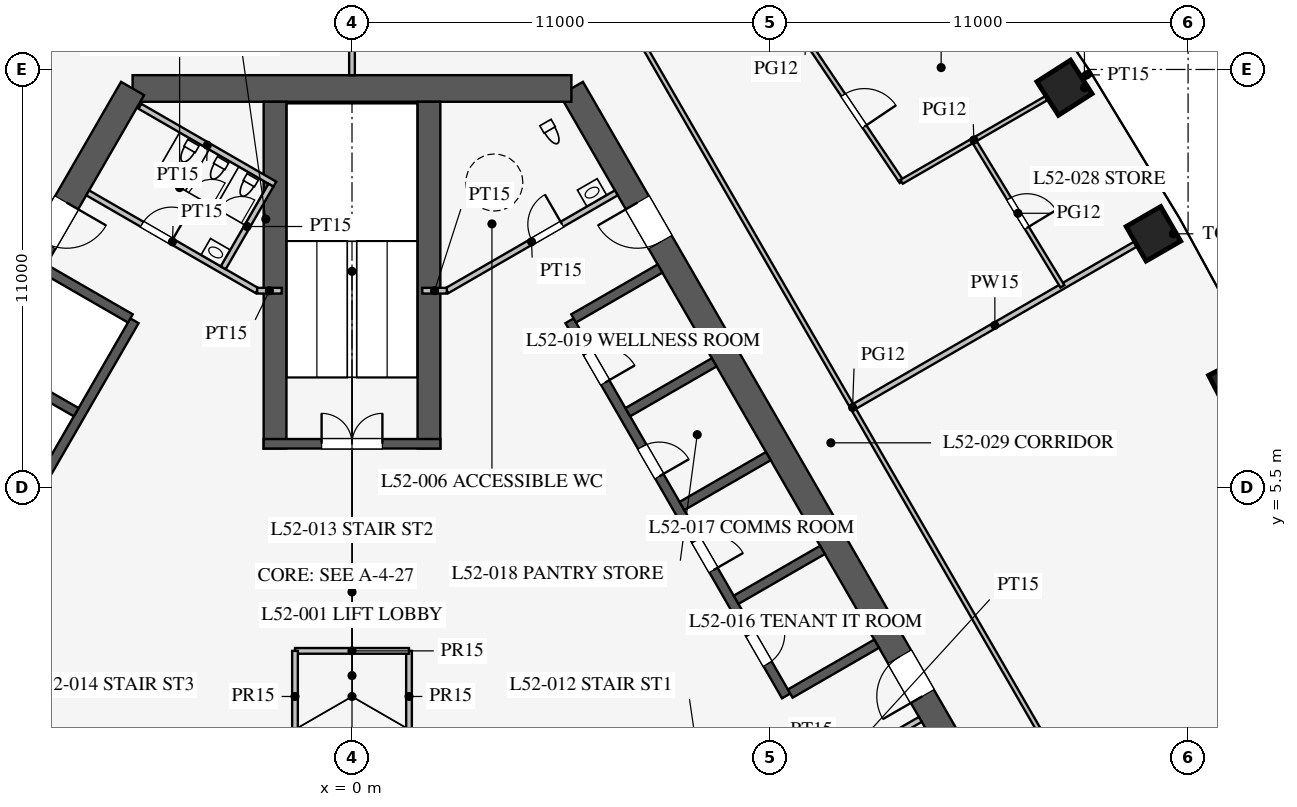
"""IFC4 building model, lengths in metres.
Left out: names, types, materials, properties, quantities, classifications, styles, units other than length and angle.
Written with IfcOpenShell. Run it as: python <this file> out.ifc"""

import sys

from ifc_helpers import new_model, si_unit, direction, frame, frame_2d, origin, origin_2d, place, context, subcontext, project, spatial, rectangle, extrude, element, fill, save


model = new_model("IFC4")
c1 = context("Model", 3, precision=1e-05, world=origin(), true_north=direction((0.0, 1.0)))
c2 = subcontext(c1, "Body", "Model", "MODEL_VIEW")
j1 = project(units=[si_unit("LENGTHUNIT", "METRE"), si_unit("PLANEANGLEUNIT", "RADIAN")], contexts=[c1])
p1 = place(None, origin())
s1 = spatial("IfcSite", under=j1, at=p1, CompositionType="ELEMENT")
p2 = place(p1, origin())
s2 = spatial("IfcBuilding", under=s1, at=p2, CompositionType="ELEMENT")
p3 = place(p2, frame((0.0, 0.0, 227.5)))
s3 = spatial("IfcBuildingStorey", under=s2, at=p3, CompositionType="ELEMENT", Elevation=227.5)
for number, where, z_axis, x_axis in (
    (1, (23.248, 8.226, 0.0), (0.0, 0.0, 1.0), (-0.46, 0.888, 0.0)),
    (2, (21.088, 12.175, 0.0), (0.0, 0.0, 1.0), (-0.5, 0.866, 0.0)),
    (3, (18.748, 16.02, 0.0), (0.0, 0.0, 1.0), (-0.539, 0.842, 0.0)),
):
    element("IfcColumn", number, at=place(p3, frame(where, z_axis=z_axis, x_axis=x_axis)), inside=s3, PredefinedType="COLUMN", context=c2, shape_type="SweptSolid", body=[
        extrude(rectangle(XDim=1.05, YDim=1.05, at=origin_2d()), origin(), (0.0, 0.0, 1.0), 4.2),
    ])
p4 = place(p3, frame((16.743, -3.0, 0.0), z_axis=(0.0, 0.0, 1.0), x_axis=(-0.500002442456, 0.866023993627, 0.0)))
e4 = element("IfcWall", 4, at=p4, inside=s3, PredefinedType="SHEAR", context=c2, shape_type="SweptSolid", body=[
    extrude(rectangle(XDim=21.939, YDim=0.7, at=frame_2d((10.97, 0.0))), origin(), (0.0, 0.0, 1.0), 4.2),
])
p5 = place(p4, frame((17.27, 0.0, 0.0)))
e5 = element("IfcOpeningElement", 5, at=p5, cuts=e4, PredefinedType="OPENING", context=c2, shape_type="SweptSolid", body=[
    extrude(rectangle(XDim=1.2, YDim=2.1, at=frame_2d((0.6, 1.05))), frame((0.0, 0.36, 0.0), z_axis=(0.0, -1.0, 0.0), x_axis=(1.0, 0.0, 0.0)), (0.0, 0.0, 1.0), 0.72),
])
p6 = place(p4, frame((3.47, 0.0, 0.0)))
e6 = element("IfcOpeningElement", 6, at=p6, cuts=e4, PredefinedType="OPENING", context=c2, shape_type="SweptSolid", body=[
    extrude(rectangle(XDim=1.2, YDim=2.1, at=frame_2d((0.6, 1.05))), frame((0.0, 0.36, 0.0), z_axis=(0.0, -1.0, 0.0), x_axis=(1.0, 0.0, 0.0)), (0.0, 0.0, 1.0), 0.72),
])
p7 = place(p3, frame((5.773, 16.0, 0.0), z_axis=(0.0, 0.0, 1.0), x_axis=(-1.0, 0.0, 0.0)))
e7 = element("IfcWall", 7, at=p7, inside=s3, PredefinedType="SHEAR", context=c2, shape_type="SweptSolid", body=[
    extrude(rectangle(XDim=11.547, YDim=0.7, at=frame_2d((5.773, 0.0))), origin(), (0.0, 0.0, 1.0), 4.2),
])
p8 = place(p3, frame((-5.773, 16.0, 0.0), z_axis=(0.0, 0.0, 1.0), x_axis=(-0.500002442456, -0.866023993627, 0.0)))
e8 = element("IfcWall", 8, at=p8, inside=s3, PredefinedType="SHEAR", context=c2, shape_type="SweptSolid", body=[
    extrude(rectangle(XDim=21.939, YDim=0.7, at=frame_2d((10.97, 0.0))), origin(), (0.0, 0.0, 1.0), 4.2),
])
p9 = place(p8, frame((17.27, 0.0, 0.0)))
e9 = element("IfcOpeningElement", 9, at=p9, cuts=e8, PredefinedType="OPENING", context=c2, shape_type="SweptSolid", body=[
    extrude(rectangle(XDim=1.2, YDim=2.1, at=frame_2d((0.6, 1.05))), frame((0.0, 0.36, 0.0), z_axis=(0.0, -1.0, 0.0), x_axis=(1.0, 0.0, 0.0)), (0.0, 0.0, 1.0), 0.72),
])
p10 = place(p8, frame((3.47, 0.0, 0.0)))
e10 = element("IfcOpeningElement", 10, at=p10, cuts=e8, PredefinedType="OPENING", context=c2, shape_type="SweptSolid", body=[
    extrude(rectangle(XDim=1.2, YDim=2.1, at=frame_2d((0.6, 1.05))), frame((0.0, 0.36, 0.0), z_axis=(0.0, -1.0, 0.0), x_axis=(1.0, 0.0, 0.0)), (0.0, 0.0, 1.0), 0.72),
])
p11 = place(p3, frame((11.424, 0.014, 0.0), z_axis=(0.0, 0.0, 1.0), x_axis=(-0.500001763848, 0.866024385424, 0.0)))
e11 = element("IfcWall", 11, at=p11, inside=s3, PredefinedType="SHEAR", context=c2, shape_type="SweptSolid", body=[
    extrude(rectangle(XDim=11.4, YDim=0.25, at=frame_2d((5.7, 0.0))), origin(), (0.0, 0.0, 1.0), 4.2),
])
p12 = place(p11, frame((0.975, 0.0, 0.0)))
e12 = element("IfcOpeningElement", 12, at=p12, cuts=e11, PredefinedType="OPENING", context=c2, shape_type="SweptSolid", body=[
    extrude(rectangle(XDim=0.9, YDim=2.1, at=frame_2d((0.45, 1.05))), frame((0.0, 0.135, 0.0), z_axis=(0.0, -1.0, 0.0), x_axis=(1.0, 0.0, 0.0)), (0.0, 0.0, 1.0), 0.27),
])
p13 = place(p11, frame((3.825, 0.0, 0.0)))
e13 = element("IfcOpeningElement", 13, at=p13, cuts=e11, PredefinedType="OPENING", context=c2, shape_type="SweptSolid", body=[
    extrude(rectangle(XDim=0.9, YDim=2.1, at=frame_2d((0.45, 1.05))), frame((0.0, 0.135, 0.0), z_axis=(0.0, -1.0, 0.0), x_axis=(1.0, 0.0, 0.0)), (0.0, 0.0, 1.0), 0.27),
])
p14 = place(p11, frame((6.675, 0.0, 0.0)))
e14 = element("IfcOpeningElement", 14, at=p14, cuts=e11, PredefinedType="OPENING", context=c2, shape_type="SweptSolid", body=[
    extrude(rectangle(XDim=0.9, YDim=2.1, at=frame_2d((0.45, 1.05))), frame((0.0, 0.135, 0.0), z_axis=(0.0, -1.0, 0.0), x_axis=(1.0, 0.0, 0.0)), (0.0, 0.0, 1.0), 0.27),
])
p15 = place(p11, frame((9.525, 0.0, 0.0)))
e15 = element("IfcOpeningElement", 15, at=p15, cuts=e11, PredefinedType="OPENING", context=c2, shape_type="SweptSolid", body=[
    extrude(rectangle(XDim=0.9, YDim=2.1, at=frame_2d((0.45, 1.05))), frame((0.0, 0.135, 0.0), z_axis=(0.0, -1.0, 0.0), x_axis=(1.0, 0.0, 0.0)), (0.0, 0.0, 1.0), 0.27),
])
for number, where, z_axis, x_axis in (
    (16, (11.532, 0.076, 0.0), (0.0, 0.0, 1.0), (0.866, 0.5, 0.0)),
    (17, (10.107, 2.544, 0.0), (0.0, 0.0, 1.0), (0.866, 0.5, 0.0)),
    (18, (8.682, 5.012, 0.0), (0.0, 0.0, 1.0), (0.866, 0.5, 0.0)),
    (19, (7.257, 7.481, 0.0), (0.0, 0.0, 1.0), (0.866, 0.5, 0.0)),
    (20, (5.832, 9.949, 0.0), (0.0, 0.0, 1.0), (0.866, 0.5, 0.0)),
):
    element("IfcWall", number, at=place(p3, frame(where, z_axis=z_axis, x_axis=x_axis)), inside=s3, PredefinedType="SHEAR", context=c2, shape_type="SweptSolid", body=[
        extrude(rectangle(XDim=2.625, YDim=0.25, at=frame_2d((1.312, 0.0))), origin(), (0.0, 0.0, 1.0), 4.2),
    ])
p16 = place(p3, frame((-5.724, 9.886, 0.0), z_axis=(0.0, 0.0, 1.0), x_axis=(-0.500001763848, -0.866024385424, 0.0)))
e21 = element("IfcWall", 21, at=p16, inside=s3, PredefinedType="SHEAR", context=c2, shape_type="SweptSolid", body=[
    extrude(rectangle(XDim=11.4, YDim=0.25, at=frame_2d((5.7, 0.0))), origin(), (0.0, 0.0, 1.0), 4.2),
])
p17 = place(p16, frame((6.525, 0.0, 0.0)))
e22 = element("IfcOpeningElement", 22, at=p17, cuts=e21, PredefinedType="OPENING", context=c2, shape_type="SweptSolid", body=[
    extrude(rectangle(XDim=1.2, YDim=2.2, at=frame_2d((0.6, 1.1))), frame((0.0, 0.135, 0.0), z_axis=(0.0, -1.0, 0.0), x_axis=(1.0, 0.0, 0.0)), (0.0, 0.0, 1.0), 0.27),
])
p18 = place(p16, frame((9.375, 0.0, 0.0)))
e23 = element("IfcOpeningElement", 23, at=p18, cuts=e21, PredefinedType="OPENING", context=c2, shape_type="SweptSolid", body=[
    extrude(rectangle(XDim=1.2, YDim=2.2, at=frame_2d((0.6, 1.1))), frame((0.0, 0.135, 0.0), z_axis=(0.0, -1.0, 0.0), x_axis=(1.0, 0.0, 0.0)), (0.0, 0.0, 1.0), 0.27),
])
for number, where, z_axis, x_axis in (
    (24, (-5.832, 9.949, 0.0), (0.0, 0.0, 1.0), (-0.866, 0.5, 0.0)),
    (25, (-7.257, 7.481, 0.0), (0.0, 0.0, 1.0), (-0.866, 0.5, 0.0)),
):
    element("IfcWall", number, at=place(p3, frame(where, z_axis=z_axis, x_axis=x_axis)), inside=s3, PredefinedType="SHEAR", context=c2, shape_type="SweptSolid", body=[
        extrude(rectangle(XDim=2.625, YDim=0.25, at=frame_2d((1.312, 0.0))), origin(), (0.0, 0.0, 1.0), 4.2),
    ])
for number, where, z_axis, x_axis in (
    (26, (2.025, 6.525, 0.0), (0.0, 0.0, 1.0), (0.0, 1.0, 0.0)),
    (27, (-2.025, 6.525, 0.0), (0.0, 0.0, 1.0), (0.0, 1.0, 0.0)),
):
    element("IfcWall", number, at=place(p3, frame(where, z_axis=z_axis, x_axis=x_axis)), inside=s3, PredefinedType="SHEAR", context=c2, shape_type="SweptSolid", body=[
        extrude(rectangle(XDim=9.125, YDim=0.6, at=frame_2d((4.562, 0.0))), origin(), (0.0, 0.0, 1.0), 4.2),
    ])
p19 = place(p3, frame((2.325, 6.65, 0.0), z_axis=(0.0, 0.0, 1.0), x_axis=(-1.0, 0.0, 0.0)))
e28 = element("IfcWall", 28, at=p19, inside=s3, PredefinedType="SHEAR", context=c2, shape_type="SweptSolid", body=[
    extrude(rectangle(XDim=4.65, YDim=0.25, at=frame_2d((2.325, 0.0))), origin(), (0.0, 0.0, 1.0), 4.2),
])
p20 = place(p19, frame((1.525, 0.0, 0.0)))
e29 = element("IfcOpeningElement", 29, at=p20, cuts=e28, PredefinedType="OPENING", context=c2, shape_type="SweptSolid", body=[
    extrude(rectangle(XDim=1.6, YDim=2.1, at=frame_2d((0.8, 1.05))), frame((0.0, 0.135, 0.0), z_axis=(0.0, -1.0, 0.0), x_axis=(1.0, 0.0, 0.0)), (0.0, 0.0, 1.0), 0.27),
])
p21 = place(p3, frame((2.495, 10.678, 0.0), z_axis=(0.0, 0.0, 1.0), x_axis=(0.866037967349, 0.499978238636, 0.0)))
e30 = element("IfcWall", 30, at=p21, inside=s3, PredefinedType="PARTITIONING", context=c2, shape_type="SweptSolid", body=[
    extrude(rectangle(XDim=5.15, YDim=0.15, at=frame_2d((2.575, 0.0))), origin(), (0.0, 0.0, 1.0), 4.0),
])
p22 = place(p21, frame((2.6, 0.0, 0.0)))
e31 = element("IfcOpeningElement", 31, at=p22, cuts=e30, PredefinedType="OPENING", context=c2, shape_type="SweptSolid", body=[
    extrude(rectangle(XDim=0.9, YDim=2.1, at=frame_2d((0.45, 1.05))), frame((0.0, 0.085, 0.0), z_axis=(0.0, -1.0, 0.0), x_axis=(1.0, 0.0, 0.0)), (0.0, 0.0, 1.0), 0.17),
])
p23 = place(p3, frame((10.495, -3.178, 0.0), z_axis=(0.0, 0.0, 1.0), x_axis=(0.866037967349, 0.499978238636, 0.0)))
e32 = element("IfcWall", 32, at=p23, inside=s3, PredefinedType="PARTITIONING", context=c2, shape_type="SweptSolid", body=[
    extrude(rectangle(XDim=5.15, YDim=0.15, at=frame_2d((2.575, 0.0))), origin(), (0.0, 0.0, 1.0), 4.0),
])
p24 = place(p23, frame((2.6, 0.0, 0.0)))
e33 = element("IfcOpeningElement", 33, at=p24, cuts=e32, PredefinedType="OPENING", context=c2, shape_type="SweptSolid", body=[
    extrude(rectangle(XDim=0.9, YDim=2.1, at=frame_2d((0.45, 1.05))), frame((0.0, 0.085, 0.0), z_axis=(0.0, -1.0, 0.0), x_axis=(1.0, 0.0, 0.0)), (0.0, 0.0, 1.0), 0.17),
])
p25 = place(p3, frame((-2.495, 10.678, 0.0), z_axis=(0.0, 0.0, 1.0), x_axis=(-0.866037967349, 0.499978238636, 0.0)))
e34 = element("IfcWall", 34, at=p25, inside=s3, PredefinedType="PARTITIONING", context=c2, shape_type="SweptSolid", body=[
    extrude(rectangle(XDim=5.15, YDim=0.15, at=frame_2d((2.575, 0.0))), origin(), (0.0, 0.0, 1.0), 4.0),
])
p26 = place(p25, frame((2.6, 0.0, 0.0)))
e35 = element("IfcOpeningElement", 35, at=p26, cuts=e34, PredefinedType="OPENING", context=c2, shape_type="SweptSolid", body=[
    extrude(rectangle(XDim=0.9, YDim=2.1, at=frame_2d((0.45, 1.05))), frame((0.0, 0.085, 0.0), z_axis=(0.0, -1.0, 0.0), x_axis=(1.0, 0.0, 0.0)), (0.0, 0.0, 1.0), 0.17),
])
for number, where, z_axis, x_axis in (
    (36, (2.495, 10.678, 0.0), (0.0, 0.0, 1.0), (-1.0, 0.0, 0.0)),
    (37, (-2.495, 10.678, 0.0), (0.0, 0.0, 1.0), (1.0, 0.0, 0.0)),
):
    element("IfcWall", number, at=place(p3, frame(where, z_axis=z_axis, x_axis=x_axis)), inside=s3, PredefinedType="PARTITIONING", context=c2, shape_type="SweptSolid", body=[
        extrude(rectangle(XDim=0.645, YDim=0.15, at=frame_2d((0.323, 0.0))), origin(), (0.0, 0.0, 1.0), 4.0),
    ])
p27 = place(p3, frame((-2.031, 13.482, 0.0), z_axis=(0.0, 0.0, 1.0), x_axis=(-0.866050731258, 0.499956128963, 0.0)))
e38 = element("IfcWall", 38, at=p27, inside=s3, PredefinedType="PARTITIONING", context=c2, shape_type="SweptSolid", body=[
    extrude(rectangle(XDim=4.1, YDim=0.15, at=frame_2d((2.05, 0.0))), origin(), (0.0, 0.0, 1.0), 4.0),
])
p28 = place(p3, frame((-3.389, 11.281, 0.0), z_axis=(0.0, 0.0, 1.0), x_axis=(0.499989096993, 0.866031698547, 0.0)))
e39 = element("IfcWall", 39, at=p28, inside=s3, PredefinedType="PARTITIONING", context=c2, shape_type="SweptSolid", body=[
    extrude(rectangle(XDim=2.51, YDim=0.15, at=frame_2d((1.255, 0.0))), origin(), (0.0, 0.0, 1.0), 4.0),
])
p29 = place(p3, frame((1.5, -1.2, 0.0), z_axis=(0.0, 0.0, 1.0), x_axis=(0.0, 1.0, 0.0)))
e40 = element("IfcWall", 40, at=p29, inside=s3, PredefinedType="PARTITIONING", context=c2, shape_type="SweptSolid", body=[
    extrude(rectangle(XDim=2.4, YDim=0.15, at=frame_2d((1.2, 0.0))), origin(), (0.0, 0.0, 1.0), 4.0),
])
p30 = place(p3, frame((1.5, 1.2, 0.0), z_axis=(0.0, 0.0, 1.0), x_axis=(-1.0, 0.0, 0.0)))
e41 = element("IfcWall", 41, at=p30, inside=s3, PredefinedType="PARTITIONING", context=c2, shape_type="SweptSolid", body=[
    extrude(rectangle(XDim=3.0, YDim=0.15, at=frame_2d((1.5, 0.0))), origin(), (0.0, 0.0, 1.0), 4.0),
])
p31 = place(p3, frame((-1.5, 1.2, 0.0), z_axis=(0.0, 0.0, 1.0), x_axis=(0.0, -1.0, 0.0)))
e42 = element("IfcWall", 42, at=p31, inside=s3, PredefinedType="PARTITIONING", context=c2, shape_type="SweptSolid", body=[
    extrude(rectangle(XDim=2.4, YDim=0.15, at=frame_2d((1.2, 0.0))), origin(), (0.0, 0.0, 1.0), 4.0),
])
p32 = place(p3, frame((0.0, 16.35, 0.0), z_axis=(0.0, 0.0, 1.0), x_axis=(0.0, 1.0, 0.0)))
e43 = element("IfcWall", 43, at=p32, inside=s3, PredefinedType="PARTITIONING", context=c2, shape_type="SweptSolid", body=[
    extrude(rectangle(XDim=15.0, YDim=0.15, at=frame_2d((7.5, 0.0))), origin(), (0.0, 0.0, 1.0), 2.4),
])
p33 = place(p3, frame((13.224, 7.635, 0.0), z_axis=(0.0, 0.0, 1.0), x_axis=(0.866035375346, 0.499982728352, 0.0)))
e44 = element("IfcWall", 44, at=p33, inside=s3, PredefinedType="PARTITIONING", context=c2, shape_type="SweptSolid", body=[
    extrude(rectangle(XDim=8.526, YDim=0.15, at=frame_2d((4.263, 0.0))), origin(), (0.0, 0.0, 1.0), 3.3),
])
p34 = place(p3, frame((26.328, -15.182, 0.0), z_axis=(0.0, 0.0, 1.0), x_axis=(-0.500000626146, 0.866025042278, 0.0)))
e45 = element("IfcWall", 45, at=p34, inside=s3, PredefinedType="PARTITIONING", context=c2, shape_type="SweptSolid", body=[
    extrude(rectangle(XDim=52.624, YDim=0.12, at=frame_2d((26.312, 0.0))), origin(), (0.0, 0.0, 1.0), 2.9),
])
p35 = place(p34, frame((10.15, 0.0, 0.15)))
e46 = element("IfcOpeningElement", 46, at=p35, cuts=e45, PredefinedType="OPENING", context=c2, shape_type="SweptSolid", body=[
    extrude(rectangle(XDim=1.8, YDim=2.1, at=frame_2d((0.9, 1.05))), frame((0.0, 0.07, 0.0), z_axis=(0.0, -1.0, 0.0), x_axis=(1.0, 0.0, 0.0)), (0.0, 0.0, 1.0), 0.14),
])
p36 = place(p34, frame((40.65, 0.0, 0.15)))
e47 = element("IfcOpeningElement", 47, at=p36, cuts=e45, PredefinedType="OPENING", context=c2, shape_type="SweptSolid", body=[
    extrude(rectangle(XDim=1.8, YDim=2.1, at=frame_2d((0.9, 1.05))), frame((0.0, 0.07, 0.0), z_axis=(0.0, -1.0, 0.0), x_axis=(1.0, 0.0, 0.0)), (0.0, 0.0, 1.0), 0.14),
])
p37 = place(p3, frame((19.227, 16.297, 0.0), z_axis=(0.0, 0.0, 1.0), x_axis=(0.866135455726, 0.499809335981, 0.0)))
e48 = element("IfcWall", 48, at=p37, inside=s3, PredefinedType="PARTITIONING", context=c2, shape_type="SweptSolid", body=[
    extrude(rectangle(XDim=0.243, YDim=0.15, at=frame_2d((0.122, 0.0))), origin(), (0.0, 0.0, 1.0), 2.9),
])
p38 = place(p3, frame((18.694, 10.793, 0.0), z_axis=(0.0, 0.0, 1.0), x_axis=(-0.519726678229, 0.854332593278, 0.0)))
e49 = element("IfcWall", 49, at=p38, inside=s3, PredefinedType="PARTITIONING", context=c2, shape_type="SweptSolid", body=[
    extrude(rectangle(XDim=4.501, YDim=0.12, at=frame_2d((2.25, 0.0))), origin(), (0.0, 0.0, 1.0), 2.9),
])
p39 = place(p38, frame((1.8, 0.0, 0.15)))
e50 = element("IfcOpeningElement", 50, at=p39, cuts=e49, PredefinedType="OPENING", context=c2, shape_type="SweptSolid", body=[
    extrude(rectangle(XDim=0.9, YDim=2.1, at=frame_2d((0.45, 1.05))), frame((0.0, 0.07, 0.0), z_axis=(0.0, -1.0, 0.0), x_axis=(1.0, 0.0, 0.0)), (0.0, 0.0, 1.0), 0.14),
])
p40 = place(p3, frame((14.462, 13.546, 0.0), z_axis=(0.0, 0.0, 1.0), x_axis=(-0.55850386778, 0.829501916619, 0.0)))
e51 = element("IfcWall", 51, at=p40, inside=s3, PredefinedType="PARTITIONING", context=c2, shape_type="SweptSolid", body=[
    extrude(rectangle(XDim=4.511, YDim=0.12, at=frame_2d((2.255, 0.0))), origin(), (0.0, 0.0, 1.0), 2.9),
])
p41 = place(p40, frame((1.75, 0.0, 0.15)))
e52 = element("IfcOpeningElement", 52, at=p41, cuts=e51, PredefinedType="OPENING", context=c2, shape_type="SweptSolid", body=[
    extrude(rectangle(XDim=1.0, YDim=2.1, at=frame_2d((0.5, 1.05))), frame((0.0, 0.07, 0.0), z_axis=(0.0, -1.0, 0.0), x_axis=(1.0, 0.0, 0.0)), (0.0, 0.0, 1.0), 0.14),
])
p42 = place(p3, frame((14.462, 13.546, 0.0), z_axis=(0.0, 0.0, 1.0), x_axis=(0.866025498715, 0.499999835575, 0.0)))
e53 = element("IfcWall", 53, at=p42, inside=s3, PredefinedType="PARTITIONING", context=c2, shape_type="SweptSolid", body=[
    extrude(rectangle(XDim=4.394, YDim=0.12, at=frame_2d((2.197, 0.0))), origin(), (0.0, 0.0, 1.0), 2.9),
])
p43 = place(p22, origin())
e54 = element("IfcDoor", 54, at=p43, inside=s3, OperationType="SINGLE_SWING_RIGHT", PredefinedType="DOOR", context=c2, shape_type="SweptSolid", body=[
    extrude(rectangle(XDim=0.9, YDim=2.1, at=frame_2d((0.45, 1.05))), frame((0.0, 0.025, 0.0), z_axis=(0.0, -1.0, 0.0), x_axis=(1.0, 0.0, 0.0)), (0.0, 0.0, 1.0), 0.05),
])
fill(e31, e54)
p44 = place(p26, frame((0.9, 0.0, 0.0), z_axis=(0.0, 0.0, 1.0), x_axis=(-1.0, 0.0, 0.0)))
e55 = element("IfcDoor", 55, at=p44, inside=s3, OperationType="SINGLE_SWING_RIGHT", PredefinedType="DOOR", context=c2, shape_type="SweptSolid", body=[
    extrude(rectangle(XDim=0.9, YDim=2.1, at=frame_2d((0.45, 1.05))), frame((0.0, 0.025, 0.0), z_axis=(0.0, -1.0, 0.0), x_axis=(1.0, 0.0, 0.0)), (0.0, 0.0, 1.0), 0.05),
])
fill(e35, e55)
p45 = place(p20, frame((1.6, 0.0, 0.0), z_axis=(0.0, 0.0, 1.0), x_axis=(-1.0, 0.0, 0.0)))
e56 = element("IfcDoor", 56, at=p45, inside=s3, OperationType="DOUBLE_DOOR_SINGLE_SWING", PredefinedType="DOOR", context=c2, shape_type="SweptSolid", body=[
    extrude(rectangle(XDim=1.6, YDim=2.1, at=frame_2d((0.8, 1.05))), frame((0.0, 0.025, 0.0), z_axis=(0.0, -1.0, 0.0), x_axis=(1.0, 0.0, 0.0)), (0.0, 0.0, 1.0), 0.05),
])
fill(e29, e56)
p46 = place(p5, origin())
e57 = element("IfcDoor", 57, at=p46, inside=s3, OperationType="SINGLE_SWING_RIGHT", PredefinedType="DOOR", context=c2, shape_type="SweptSolid", body=[
    extrude(rectangle(XDim=1.2, YDim=2.1, at=frame_2d((0.6, 1.05))), frame((0.0, 0.025, 0.0), z_axis=(0.0, -1.0, 0.0), x_axis=(1.0, 0.0, 0.0)), (0.0, 0.0, 1.0), 0.05),
])
fill(e5, e57)
p47 = place(p6, origin())
e58 = element("IfcDoor", 58, at=p47, inside=s3, OperationType="SINGLE_SWING_LEFT", PredefinedType="DOOR", context=c2, shape_type="SweptSolid", body=[
    extrude(rectangle(XDim=1.2, YDim=2.1, at=frame_2d((0.6, 1.05))), frame((0.0, 0.025, 0.0), z_axis=(0.0, -1.0, 0.0), x_axis=(1.0, 0.0, 0.0)), (0.0, 0.0, 1.0), 0.05),
])
fill(e6, e58)
p48 = place(p10, origin())
e59 = element("IfcDoor", 59, at=p48, inside=s3, OperationType="SINGLE_SWING_LEFT", PredefinedType="DOOR", context=c2, shape_type="SweptSolid", body=[
    extrude(rectangle(XDim=1.2, YDim=2.1, at=frame_2d((0.6, 1.05))), frame((0.0, 0.025, 0.0), z_axis=(0.0, -1.0, 0.0), x_axis=(1.0, 0.0, 0.0)), (0.0, 0.0, 1.0), 0.05),
])
fill(e10, e59)
p49 = place(p12, frame((0.9, 0.0, 0.0), z_axis=(0.0, 0.0, 1.0), x_axis=(-1.0, 0.0, 0.0)))
e60 = element("IfcDoor", 60, at=p49, inside=s3, OperationType="SINGLE_SWING_LEFT", PredefinedType="DOOR", context=c2, shape_type="SweptSolid", body=[
    extrude(rectangle(XDim=0.9, YDim=2.1, at=frame_2d((0.45, 1.05))), frame((0.0, 0.025, 0.0), z_axis=(0.0, -1.0, 0.0), x_axis=(1.0, 0.0, 0.0)), (0.0, 0.0, 1.0), 0.05),
])
fill(e12, e60)
p50 = place(p13, frame((0.9, 0.0, 0.0), z_axis=(0.0, 0.0, 1.0), x_axis=(-1.0, 0.0, 0.0)))
e61 = element("IfcDoor", 61, at=p50, inside=s3, OperationType="SINGLE_SWING_RIGHT", PredefinedType="DOOR", context=c2, shape_type="SweptSolid", body=[
    extrude(rectangle(XDim=0.9, YDim=2.1, at=frame_2d((0.45, 1.05))), frame((0.0, 0.025, 0.0), z_axis=(0.0, -1.0, 0.0), x_axis=(1.0, 0.0, 0.0)), (0.0, 0.0, 1.0), 0.05),
])
fill(e13, e61)
p51 = place(p14, frame((0.9, 0.0, 0.0), z_axis=(0.0, 0.0, 1.0), x_axis=(-1.0, 0.0, 0.0)))
e62 = element("IfcDoor", 62, at=p51, inside=s3, OperationType="SINGLE_SWING_RIGHT", PredefinedType="DOOR", context=c2, shape_type="SweptSolid", body=[
    extrude(rectangle(XDim=0.9, YDim=2.1, at=frame_2d((0.45, 1.05))), frame((0.0, 0.025, 0.0), z_axis=(0.0, -1.0, 0.0), x_axis=(1.0, 0.0, 0.0)), (0.0, 0.0, 1.0), 0.05),
])
fill(e14, e62)
p52 = place(p15, frame((0.9, 0.0, 0.0), z_axis=(0.0, 0.0, 1.0), x_axis=(-1.0, 0.0, 0.0)))
e63 = element("IfcDoor", 63, at=p52, inside=s3, OperationType="SINGLE_SWING_RIGHT", PredefinedType="DOOR", context=c2, shape_type="SweptSolid", body=[
    extrude(rectangle(XDim=0.9, YDim=2.1, at=frame_2d((0.45, 1.05))), frame((0.0, 0.025, 0.0), z_axis=(0.0, -1.0, 0.0), x_axis=(1.0, 0.0, 0.0)), (0.0, 0.0, 1.0), 0.05),
])
fill(e15, e63)
p53 = place(p41, frame((1.0, 0.0, 0.0), z_axis=(0.0, 0.0, 1.0), x_axis=(-1.0, 0.0, 0.0)))
e64 = element("IfcDoor", 64, at=p53, inside=s3, OperationType="SINGLE_SWING_RIGHT", PredefinedType="DOOR", context=c2, shape_type="SweptSolid", body=[
    extrude(rectangle(XDim=1.0, YDim=2.1, at=frame_2d((0.5, 1.05))), frame((0.0, 0.025, 0.0), z_axis=(0.0, -1.0, 0.0), x_axis=(1.0, 0.0, 0.0)), (0.0, 0.0, 1.0), 0.05),
])
fill(e52, e64)
p54 = place(p39, frame((0.9, 0.0, 0.0), z_axis=(0.0, 0.0, 1.0), x_axis=(-1.0, 0.0, 0.0)))
e65 = element("IfcDoor", 65, at=p54, inside=s3, OperationType="SINGLE_SWING_RIGHT", PredefinedType="DOOR", context=c2, shape_type="SweptSolid", body=[
    extrude(rectangle(XDim=0.9, YDim=2.1, at=frame_2d((0.45, 1.05))), frame((0.0, 0.025, 0.0), z_axis=(0.0, -1.0, 0.0), x_axis=(1.0, 0.0, 0.0)), (0.0, 0.0, 1.0), 0.05),
])
fill(e50, e65)
save(model, sys.argv[1])
